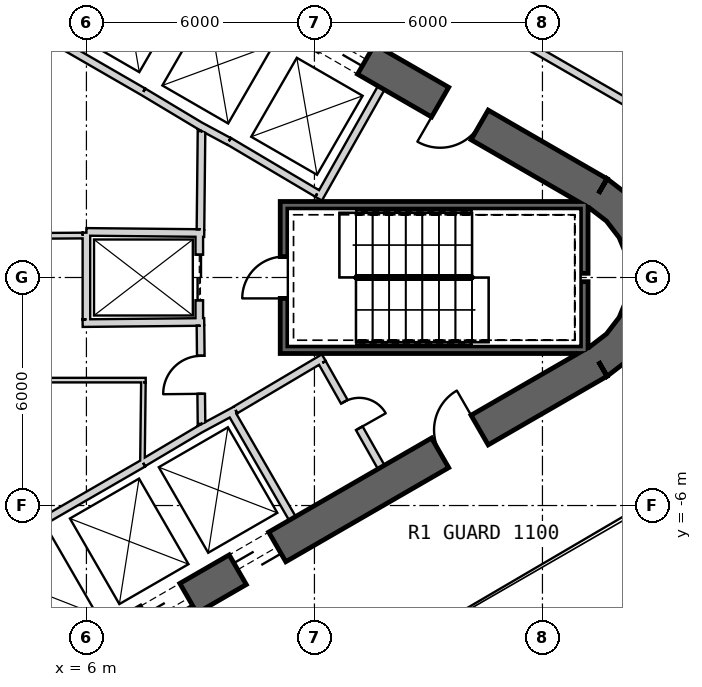
"""IFC4 building model, lengths in metres.
Left out: names, types, materials, properties, quantities, classifications, styles, units other than length and angle.
Written with IfcOpenShell. Run it as: python <this file> out.ifc"""

import sys

from ifc_helpers import new_model, si_unit, direction, frame, frame_2d, origin, place, context, subcontext, project, spatial, polyline, rectangle, outline, extrude, element, fill, save


model = new_model("IFC4")
c1 = context("Model", 3, precision=1e-05, world=origin(), true_north=direction((0.0, 1.0)))
c2 = subcontext(c1, "Body", "Model", "MODEL_VIEW")
j1 = project(units=[si_unit("LENGTHUNIT", "METRE"), si_unit("PLANEANGLEUNIT", "RADIAN")], contexts=[c1])
p1 = place(None, origin())
s1 = spatial("IfcSite", under=j1, at=p1, CompositionType="ELEMENT")
p2 = place(p1, origin())
s2 = spatial("IfcBuilding", under=s1, at=p2, CompositionType="ELEMENT")
p3 = place(p2, frame((0.0, 0.0, 27.5)))
s3 = spatial("IfcBuildingStorey", under=s2, at=p3, CompositionType="ELEMENT", Elevation=27.5)
p4 = place(p3, frame((19.475, 2.208, 0.0), z_axis=(0.0, 0.0, 1.0), x_axis=(-0.866028369851, 0.499994862586, 0.0)))
e1 = element("IfcWall", 1, at=p4, inside=s3, PredefinedType="SHEAR", context=c2, shape_type="SweptSolid", body=[
    extrude(rectangle(XDim=31.523, YDim=0.9, at=frame_2d((15.762, 0.0))), origin(), (0.0, 0.0, 1.0), 6.0),
])
p5 = place(p4, frame((7.062, 0.0, 0.0)))
e2 = element("IfcOpeningElement", 2, at=p5, cuts=e1, PredefinedType="OPENING", context=c2, shape_type="SweptSolid", body=[
    extrude(rectangle(XDim=1.2, YDim=2.4, at=frame_2d((0.6, 1.2))), frame((0.0, 0.46, 0.0), z_axis=(0.0, -1.0, 0.0), x_axis=(1.0, 0.0, 0.0)), (0.0, 0.0, 1.0), 0.92),
])
p6 = place(p4, frame((9.762, 0.0, 0.0)))
e3 = element("IfcOpeningElement", 3, at=p6, cuts=e1, PredefinedType="OPENING", context=c2, shape_type="SweptSolid", body=[
    extrude(rectangle(XDim=1.2, YDim=2.4, at=frame_2d((0.6, 1.2))), frame((0.0, 0.46, 0.0), z_axis=(0.0, -1.0, 0.0), x_axis=(1.0, 0.0, 0.0)), (0.0, 0.0, 1.0), 0.92),
])
p7 = place(p4, frame((12.462, 0.0, 0.0)))
e4 = element("IfcOpeningElement", 4, at=p7, cuts=e1, PredefinedType="OPENING", context=c2, shape_type="SweptSolid", body=[
    extrude(rectangle(XDim=1.2, YDim=2.4, at=frame_2d((0.6, 1.2))), frame((0.0, 0.46, 0.0), z_axis=(0.0, -1.0, 0.0), x_axis=(1.0, 0.0, 0.0)), (0.0, 0.0, 1.0), 0.92),
])
p8 = place(p4, frame((15.162, 0.0, 0.0)))
e5 = element("IfcOpeningElement", 5, at=p8, cuts=e1, PredefinedType="OPENING", context=c2, shape_type="SweptSolid", body=[
    extrude(rectangle(XDim=1.2, YDim=2.4, at=frame_2d((0.6, 1.2))), frame((0.0, 0.46, 0.0), z_axis=(0.0, -1.0, 0.0), x_axis=(1.0, 0.0, 0.0)), (0.0, 0.0, 1.0), 0.92),
])
p9 = place(p4, frame((17.862, 0.0, 0.0)))
e6 = element("IfcOpeningElement", 6, at=p9, cuts=e1, PredefinedType="OPENING", context=c2, shape_type="SweptSolid", body=[
    extrude(rectangle(XDim=1.2, YDim=2.4, at=frame_2d((0.6, 1.2))), frame((0.0, 0.46, 0.0), z_axis=(0.0, -1.0, 0.0), x_axis=(1.0, 0.0, 0.0)), (0.0, 0.0, 1.0), 0.92),
])
p10 = place(p4, frame((20.562, 0.0, 0.0)))
e7 = element("IfcOpeningElement", 7, at=p10, cuts=e1, PredefinedType="OPENING", context=c2, shape_type="SweptSolid", body=[
    extrude(rectangle(XDim=1.2, YDim=2.4, at=frame_2d((0.6, 1.2))), frame((0.0, 0.46, 0.0), z_axis=(0.0, -1.0, 0.0), x_axis=(1.0, 0.0, 0.0)), (0.0, 0.0, 1.0), 0.92),
])
p11 = place(p4, frame((23.262, 0.0, 0.0)))
e8 = element("IfcOpeningElement", 8, at=p11, cuts=e1, PredefinedType="OPENING", context=c2, shape_type="SweptSolid", body=[
    extrude(rectangle(XDim=1.2, YDim=2.4, at=frame_2d((0.6, 1.2))), frame((0.0, 0.46, 0.0), z_axis=(0.0, -1.0, 0.0), x_axis=(1.0, 0.0, 0.0)), (0.0, 0.0, 1.0), 0.92),
])
p12 = place(p4, frame((3.612, 0.0, 0.0)))
e9 = element("IfcOpeningElement", 9, at=p12, cuts=e1, PredefinedType="OPENING", context=c2, shape_type="SweptSolid", body=[
    extrude(rectangle(XDim=1.2, YDim=2.4, at=frame_2d((0.6, 1.2))), frame((0.0, 0.46, 0.0), z_axis=(0.0, -1.0, 0.0), x_axis=(1.0, 0.0, 0.0)), (0.0, 0.0, 1.0), 0.92),
])
p13 = place(p4, frame((26.712, 0.0, 0.0)))
e10 = element("IfcOpeningElement", 10, at=p13, cuts=e1, PredefinedType="OPENING", context=c2, shape_type="SweptSolid", body=[
    extrude(rectangle(XDim=1.2, YDim=2.4, at=frame_2d((0.6, 1.2))), frame((0.0, 0.46, 0.0), z_axis=(0.0, -1.0, 0.0), x_axis=(1.0, 0.0, 0.0)), (0.0, 0.0, 1.0), 0.92),
])
p14 = place(p3, frame((-7.825, -17.97, 0.0), z_axis=(0.0, 0.0, 1.0), x_axis=(0.866028369851, 0.499994862586, 0.0)))
e11 = element("IfcWall", 11, at=p14, inside=s3, PredefinedType="SHEAR", context=c2, shape_type="SweptSolid", body=[
    extrude(rectangle(XDim=31.523, YDim=0.9, at=frame_2d((15.762, 0.0))), origin(), (0.0, 0.0, 1.0), 6.0),
])
p15 = place(p14, frame((7.062, 0.0, 0.0)))
e12 = element("IfcOpeningElement", 12, at=p15, cuts=e11, PredefinedType="OPENING", context=c2, shape_type="SweptSolid", body=[
    extrude(rectangle(XDim=1.2, YDim=2.4, at=frame_2d((0.6, 1.2))), frame((0.0, 0.46, 0.0), z_axis=(0.0, -1.0, 0.0), x_axis=(1.0, 0.0, 0.0)), (0.0, 0.0, 1.0), 0.92),
])
p16 = place(p14, frame((9.762, 0.0, 0.0)))
e13 = element("IfcOpeningElement", 13, at=p16, cuts=e11, PredefinedType="OPENING", context=c2, shape_type="SweptSolid", body=[
    extrude(rectangle(XDim=1.2, YDim=2.4, at=frame_2d((0.6, 1.2))), frame((0.0, 0.46, 0.0), z_axis=(0.0, -1.0, 0.0), x_axis=(1.0, 0.0, 0.0)), (0.0, 0.0, 1.0), 0.92),
])
p17 = place(p14, frame((12.462, 0.0, 0.0)))
e14 = element("IfcOpeningElement", 14, at=p17, cuts=e11, PredefinedType="OPENING", context=c2, shape_type="SweptSolid", body=[
    extrude(rectangle(XDim=1.2, YDim=2.4, at=frame_2d((0.6, 1.2))), frame((0.0, 0.46, 0.0), z_axis=(0.0, -1.0, 0.0), x_axis=(1.0, 0.0, 0.0)), (0.0, 0.0, 1.0), 0.92),
])
p18 = place(p14, frame((15.162, 0.0, 0.0)))
e15 = element("IfcOpeningElement", 15, at=p18, cuts=e11, PredefinedType="OPENING", context=c2, shape_type="SweptSolid", body=[
    extrude(rectangle(XDim=1.2, YDim=2.4, at=frame_2d((0.6, 1.2))), frame((0.0, 0.46, 0.0), z_axis=(0.0, -1.0, 0.0), x_axis=(1.0, 0.0, 0.0)), (0.0, 0.0, 1.0), 0.92),
])
p19 = place(p14, frame((17.862, 0.0, 0.0)))
e16 = element("IfcOpeningElement", 16, at=p19, cuts=e11, PredefinedType="OPENING", context=c2, shape_type="SweptSolid", body=[
    extrude(rectangle(XDim=1.2, YDim=2.4, at=frame_2d((0.6, 1.2))), frame((0.0, 0.46, 0.0), z_axis=(0.0, -1.0, 0.0), x_axis=(1.0, 0.0, 0.0)), (0.0, 0.0, 1.0), 0.92),
])
p20 = place(p14, frame((20.562, 0.0, 0.0)))
e17 = element("IfcOpeningElement", 17, at=p20, cuts=e11, PredefinedType="OPENING", context=c2, shape_type="SweptSolid", body=[
    extrude(rectangle(XDim=1.2, YDim=2.4, at=frame_2d((0.6, 1.2))), frame((0.0, 0.46, 0.0), z_axis=(0.0, -1.0, 0.0), x_axis=(1.0, 0.0, 0.0)), (0.0, 0.0, 1.0), 0.92),
])
p21 = place(p14, frame((26.712, 0.0, 0.0)))
e18 = element("IfcOpeningElement", 18, at=p21, cuts=e11, PredefinedType="OPENING", context=c2, shape_type="SweptSolid", body=[
    extrude(rectangle(XDim=1.2, YDim=2.4, at=frame_2d((0.6, 1.2))), frame((0.0, 0.46, 0.0), z_axis=(0.0, -1.0, 0.0), x_axis=(1.0, 0.0, 0.0)), (0.0, 0.0, 1.0), 0.92),
])
p22 = place(p14, frame((3.612, 0.0, 0.0)))
e19 = element("IfcOpeningElement", 19, at=p22, cuts=e11, PredefinedType="OPENING", context=c2, shape_type="SweptSolid", body=[
    extrude(rectangle(XDim=1.2, YDim=2.4, at=frame_2d((0.6, 1.2))), frame((0.0, 0.46, 0.0), z_axis=(0.0, -1.0, 0.0), x_axis=(1.0, 0.0, 0.0)), (0.0, 0.0, 1.0), 0.92),
])
p23 = place(p3, origin())
e20 = element("IfcWall", 20, at=p23, inside=s3, PredefinedType="SHEAR", context=c2, shape_type="SweptSolid", body=[
    extrude(outline(polyline([(19.7, -2.598), (20.321, -2.121), (20.798, -1.5), (21.098, -0.777), (21.2, 0.0), (21.098, 0.777), (20.798, 1.5), (20.321, 2.121), (19.7, 2.598), (19.25, 1.819), (19.685, 1.485), (20.019, 1.05), (20.229, 0.543), (20.3, 0.0), (20.229, -0.543), (20.019, -1.05), (19.685, -1.485), (19.25, -1.819), (19.7, -2.598)])), origin(), (0.0, 0.0, 1.0), 6.0),
])
p24 = place(p3, frame((7.497, 4.886, 0.0), z_axis=(0.0, 0.0, 1.0), x_axis=(-0.866030989016, 0.499990325971, 0.0)))
e21 = element("IfcWall", 21, at=p24, inside=s3, PredefinedType="PLUMBINGWALL", context=c2, shape_type="SweptSolid", body=[
    extrude(rectangle(XDim=8.1, YDim=0.2, at=frame_2d((4.05, 0.0))), origin(), (0.0, 0.0, 1.0), 5.7),
])
p25 = place(p3, frame((12.11, 2.073, 0.0), z_axis=(0.0, 0.0, 1.0), x_axis=(0.49196600604, 0.870614408852, 0.0)))
e22 = element("IfcWall", 22, at=p25, inside=s3, PredefinedType="PLUMBINGWALL", context=c2, shape_type="SweptSolid", body=[
    extrude(rectangle(XDim=3.35, YDim=0.2, at=frame_2d((1.675, 0.0))), origin(), (0.0, 0.0, 1.0), 5.7),
])
p26 = place(p3, frame((12.073, 2.211, 0.0), z_axis=(0.0, 0.0, 1.0), x_axis=(-0.860438357912, 0.509554542943, 0.0)))
e23 = element("IfcWall", 23, at=p26, inside=s3, PredefinedType="PLUMBINGWALL", context=c2, shape_type="SweptSolid", body=[
    extrude(rectangle(XDim=2.7, YDim=0.2, at=frame_2d((1.35, 0.0))), origin(), (0.0, 0.0, 1.0), 5.7),
])
p27 = place(p3, frame((9.748, 3.583, 0.0), z_axis=(0.0, 0.0, 1.0), x_axis=(-0.880917147855, 0.473270513147, 0.0)))
e24 = element("IfcWall", 24, at=p27, inside=s3, PredefinedType="PLUMBINGWALL", context=c2, shape_type="SweptSolid", body=[
    extrude(rectangle(XDim=0.878, YDim=0.2, at=frame_2d((0.439, 0.0))), origin(), (0.0, 0.0, 1.0), 5.7),
])
p28 = place(p3, frame((9.079, 3.937, 0.0), z_axis=(0.0, 0.0, 1.0), x_axis=(-0.857516281273, 0.51445682749, 0.0)))
e25 = element("IfcWall", 25, at=p28, inside=s3, PredefinedType="PLUMBINGWALL", context=c2, shape_type="SweptSolid", body=[
    extrude(rectangle(XDim=1.845, YDim=0.2, at=frame_2d((0.922, 0.0))), origin(), (0.0, 0.0, 1.0), 5.7),
])
p29 = place(p3, frame((0.483, -8.936, 0.0), z_axis=(0.0, 0.0, 1.0), x_axis=(0.866030989016, 0.499990325971, 0.0)))
e26 = element("IfcWall", 26, at=p29, inside=s3, PredefinedType="PLUMBINGWALL", context=c2, shape_type="SweptSolid", body=[
    extrude(rectangle(XDim=8.1, YDim=0.2, at=frame_2d((4.05, 0.0))), origin(), (0.0, 0.0, 1.0), 5.7),
])
p30 = place(p3, frame((9.795, -3.525, 0.0), z_axis=(0.0, 0.0, 1.0), x_axis=(0.499984717929, -0.866034226713, 0.0)))
e27 = element("IfcWall", 27, at=p30, inside=s3, PredefinedType="PLUMBINGWALL", context=c2, shape_type="SweptSolid", body=[
    extrude(rectangle(XDim=3.25, YDim=0.2, at=frame_2d((1.625, 0.0))), origin(), (0.0, 0.0, 1.0), 5.7),
])
p31 = place(p3, frame((8.974, -3.999, 0.0), z_axis=(0.0, 0.0, 1.0), x_axis=(0.880907015104, 0.473289373154, 0.0)))
e28 = element("IfcWall", 28, at=p31, inside=s3, PredefinedType="PLUMBINGWALL", context=c2, shape_type="SweptSolid", body=[
    extrude(rectangle(XDim=1.078, YDim=0.2, at=frame_2d((0.539, 0.0))), origin(), (0.0, 0.0, 1.0), 5.7),
])
p32 = place(p3, frame((7.493, -4.878, 0.0), z_axis=(0.0, 0.0, 1.0), x_axis=(0.859981807212, 0.510324691999, 0.0)))
e29 = element("IfcWall", 29, at=p32, inside=s3, PredefinedType="PLUMBINGWALL", context=c2, shape_type="SweptSolid", body=[
    extrude(rectangle(XDim=1.845, YDim=0.2, at=frame_2d((0.922, 0.0))), origin(), (0.0, 0.0, 1.0), 5.7),
])
p33 = place(p3, frame((19.2, 1.9, -0.3), z_axis=(0.0, 0.0, 1.0), x_axis=(-1.0, 0.0, 0.0)))
e30 = element("IfcWall", 30, at=p33, inside=s3, PredefinedType="SHEAR", context=c2, shape_type="SweptSolid", body=[
    extrude(rectangle(XDim=8.1, YDim=0.2, at=frame_2d((4.05, 0.0))), origin(), (0.0, 0.0, 1.0), 6.0),
])
p34 = place(p3, frame((19.1, -2.0, -0.3), z_axis=(0.0, 0.0, 1.0), x_axis=(0.0, 1.0, 0.0)))
e31 = element("IfcWall", 31, at=p34, inside=s3, PredefinedType="SHEAR", context=c2, shape_type="SweptSolid", body=[
    extrude(rectangle(XDim=1.89, YDim=0.2, at=frame_2d((0.945, 0.0))), origin(), (0.0, 0.0, 1.0), 6.0),
])
p35 = place(p3, frame((19.1, 0.11, -0.3), z_axis=(0.0, 0.0, 1.0), x_axis=(0.0, 1.0, 0.0)))
e32 = element("IfcWall", 32, at=p35, inside=s3, PredefinedType="SHEAR", context=c2, shape_type="SweptSolid", body=[
    extrude(rectangle(XDim=1.69, YDim=0.2, at=frame_2d((0.845, 0.0))), origin(), (0.0, 0.0, 1.0), 6.0),
])
p36 = place(p3, frame((11.1, -1.9, -0.3), z_axis=(0.0, 0.0, 1.0), x_axis=(1.0, 0.0, 0.0)))
e33 = element("IfcWall", 33, at=p36, inside=s3, PredefinedType="SHEAR", context=c2, shape_type="SweptSolid", body=[
    extrude(rectangle(XDim=7.9, YDim=0.2, at=frame_2d((3.95, 0.0))), origin(), (0.0, 0.0, 1.0), 6.0),
])
p37 = place(p3, frame((11.2, -1.8, -0.3), z_axis=(0.0, 0.0, 1.0), x_axis=(0.0, 1.0, 0.0)))
e34 = element("IfcWall", 34, at=p37, inside=s3, PredefinedType="SHEAR", context=c2, shape_type="SweptSolid", body=[
    extrude(rectangle(XDim=3.6, YDim=0.2, at=frame_2d((1.8, 0.0))), origin(), (0.0, 0.0, 1.0), 6.0),
])
p38 = place(p37, frame((1.25, 0.0, 0.3)))
e35 = element("IfcOpeningElement", 35, at=p38, cuts=e34, PredefinedType="OPENING", context=c2, shape_type="SweptSolid", body=[
    extrude(rectangle(XDim=1.1, YDim=2.1, at=frame_2d((0.55, 1.05))), frame((0.0, 0.11, 0.0), z_axis=(0.0, -1.0, 0.0), x_axis=(1.0, 0.0, 0.0)), (0.0, 0.0, 1.0), 0.22),
])
p39 = place(p3, frame((8.97, 1.2, 0.0), z_axis=(0.0, 0.0, 1.0), x_axis=(0.0, -1.0, 0.0)))
e36 = element("IfcWall", 36, at=p39, inside=s3, PredefinedType="PLUMBINGWALL", context=c2, shape_type="SweptSolid", body=[
    extrude(rectangle(XDim=2.4, YDim=0.2, at=frame_2d((1.2, 0.0))), origin(), (0.0, 0.0, 1.0), 5.7),
])
p40 = place(p39, frame((0.6, 0.0, 0.0)))
e37 = element("IfcOpeningElement", 37, at=p40, cuts=e36, PredefinedType="OPENING", context=c2, shape_type="SweptSolid", body=[
    extrude(rectangle(XDim=1.2, YDim=2.4, at=frame_2d((0.6, 1.2))), frame((0.0, 0.11, 0.0), z_axis=(0.0, -1.0, 0.0), x_axis=(1.0, 0.0, 0.0)), (0.0, 0.0, 1.0), 0.22),
])
p41 = place(p3, frame((6.0, 1.2, 0.0), z_axis=(0.0, 0.0, 1.0), x_axis=(0.999949988, -0.010001074852, 0.0)))
e38 = element("IfcWall", 38, at=p41, inside=s3, PredefinedType="PLUMBINGWALL", context=c2, shape_type="SweptSolid", body=[
    extrude(rectangle(XDim=3.1, YDim=0.2, at=frame_2d((1.55, 0.0))), origin(), (0.0, 0.0, 1.0), 5.7),
])
p42 = place(p3, frame((5.9, -1.201, 0.0), z_axis=(0.0, 0.0, 1.0), x_axis=(0.999950064753, 0.009993397809, 0.0)))
e39 = element("IfcWall", 39, at=p42, inside=s3, PredefinedType="PLUMBINGWALL", context=c2, shape_type="SweptSolid", body=[
    extrude(rectangle(XDim=3.2, YDim=0.2, at=frame_2d((1.6, 0.0))), origin(), (0.0, 0.0, 1.0), 5.7),
])
p43 = place(p3, frame((6.0, -1.1, 0.0), z_axis=(0.0, 0.0, 1.0), x_axis=(0.0, 1.0, 0.0)))
e40 = element("IfcWall", 40, at=p43, inside=s3, PredefinedType="PLUMBINGWALL", context=c2, shape_type="SweptSolid", body=[
    extrude(rectangle(XDim=2.28, YDim=0.2, at=frame_2d((1.14, 0.0))), origin(), (0.0, 0.0, 1.0), 5.7),
])
p44 = place(p3, frame((12.245, -2.109, 0.0), z_axis=(0.0, 0.0, 1.0), x_axis=(-0.860414880418, -0.509594185166, 0.0)))
e41 = element("IfcWall", 41, at=p44, inside=s3, PredefinedType="PARTITIONING", context=c2, shape_type="SweptSolid", body=[
    extrude(rectangle(XDim=2.7, YDim=0.2, at=frame_2d((1.35, 0.0))), origin(), (0.0, 0.0, 1.0), 5.7),
])
p45 = place(p3, frame((13.758, -4.99, 0.0), z_axis=(0.0, 0.0, 1.0), x_axis=(-0.491993409184, 0.87059892334, 0.0)))
e42 = element("IfcWall", 42, at=p45, inside=s3, PredefinedType="PARTITIONING", context=c2, shape_type="SweptSolid", body=[
    extrude(rectangle(XDim=3.15, YDim=0.2, at=frame_2d((1.575, 0.0))), origin(), (0.0, 0.0, 1.0), 5.7),
])
p46 = place(p45, frame((1.175, 0.0, 0.0)))
e43 = element("IfcOpeningElement", 43, at=p46, cuts=e42, PredefinedType="OPENING", context=c2, shape_type="SweptSolid", body=[
    extrude(rectangle(XDim=0.8, YDim=2.1, at=frame_2d((0.4, 1.05))), frame((0.0, 0.11, 0.0), z_axis=(0.0, -1.0, 0.0), x_axis=(1.0, 0.0, 0.0)), (0.0, 0.0, 1.0), 0.22),
])
p47 = place(p3, frame((9.001, 1.27, 0.0), z_axis=(0.0, 0.0, 1.0), x_axis=(0.010784614026, 0.999941844359, 0.0)))
e44 = element("IfcWall", 44, at=p47, inside=s3, PredefinedType="PARTITIONING", context=c2, shape_type="SweptSolid", body=[
    extrude(rectangle(XDim=2.581, YDim=0.2, at=frame_2d((1.291, 0.0))), origin(), (0.0, 0.0, 1.0), 5.7),
])
p48 = place(p3, frame((9.029, -3.851, 0.0), z_axis=(0.0, 0.0, 1.0), x_axis=(-0.010783593937, 0.99994185536, 0.0)))
e45 = element("IfcWall", 45, at=p48, inside=s3, PredefinedType="PARTITIONING", context=c2, shape_type="SweptSolid", body=[
    extrude(rectangle(XDim=2.581, YDim=0.2, at=frame_2d((1.291, 0.0))), origin(), (0.0, 0.0, 1.0), 5.7),
])
p49 = place(p48, frame((0.791, 0.0, 0.0)))
e46 = element("IfcOpeningElement", 46, at=p49, cuts=e45, PredefinedType="OPENING", context=c2, shape_type="SweptSolid", body=[
    extrude(rectangle(XDim=1.0, YDim=2.1, at=frame_2d((0.5, 1.05))), frame((0.0, 0.11, 0.0), z_axis=(0.0, -1.0, 0.0), x_axis=(1.0, 0.0, 0.0)), (0.0, 0.0, 1.0), 0.22),
])
p50 = place(p3, frame((1.388, 1.074, 0.0), z_axis=(0.0, 0.0, 1.0), x_axis=(0.99997856967, 0.006546770205, 0.0)))
e47 = element("IfcWall", 47, at=p50, inside=s3, PredefinedType="PLUMBINGWALL", context=c2, shape_type="SweptSolid", body=[
    extrude(rectangle(XDim=4.512, YDim=0.15, at=frame_2d((2.256, 0.0))), origin(), (0.0, 0.0, 1.0), 5.7),
])
p51 = place(p50, frame((1.92, 0.0, 0.0)))
e48 = element("IfcOpeningElement", 48, at=p51, cuts=e47, PredefinedType="OPENING", context=c2, shape_type="SweptSolid", body=[
    extrude(rectangle(XDim=0.8, YDim=2.1, at=frame_2d((0.4, 1.05))), frame((0.0, 0.085, 0.0), z_axis=(0.0, -1.0, 0.0), x_axis=(1.0, 0.0, 0.0)), (0.0, 0.0, 1.0), 0.17),
])
p52 = place(p3, frame((7.56, -2.7, 0.0), z_axis=(0.0, 0.0, 1.0), x_axis=(-1.0, 0.0, 0.0)))
e49 = element("IfcWall", 49, at=p52, inside=s3, PredefinedType="PARTITIONING", context=c2, shape_type="SweptSolid", body=[
    extrude(rectangle(XDim=3.0, YDim=0.12, at=frame_2d((1.5, 0.0))), origin(), (0.0, 0.0, 1.0), 5.7),
])
p53 = place(p3, frame((7.475, -4.865, 0.0), z_axis=(0.0, 0.0, 1.0), x_axis=(0.011716133148, 0.999931363757, 0.0)))
e50 = element("IfcWall", 50, at=p53, inside=s3, PredefinedType="PARTITIONING", context=c2, shape_type="SweptSolid", body=[
    extrude(rectangle(XDim=2.105, YDim=0.12, at=frame_2d((1.052, 0.0))), origin(), (0.0, 0.0, 1.0), 5.7),
])
p54 = place(p3, frame((21.161, 4.064, 0.0), z_axis=(0.0, 0.0, 1.0), x_axis=(-0.866012938262, 0.500021590297, 0.0)))
e51 = element("IfcWall", 51, at=p54, inside=s3, PredefinedType="PARTITIONING", context=c2, shape_type="SweptSolid", body=[
    extrude(rectangle(XDim=4.592, YDim=0.2, at=frame_2d((2.296, 0.0))), origin(), (0.0, 0.0, 1.0), 4.88),
])
p55 = place(p38, origin())
e52 = element("IfcDoor", 52, at=p55, inside=s3, OperationType="SINGLE_SWING_LEFT", PredefinedType="USERDEFINED", context=c2, shape_type="SweptSolid", body=[
    extrude(rectangle(XDim=1.1, YDim=2.1, at=frame_2d((0.55, 1.05))), frame((0.0, 0.025, 0.0), z_axis=(0.0, -1.0, 0.0), x_axis=(1.0, 0.0, 0.0)), (0.0, 0.0, 1.0), 0.05),
])
fill(e35, e52)
p56 = place(p49, origin())
e53 = element("IfcDoor", 53, at=p56, inside=s3, OperationType="SINGLE_SWING_LEFT", PredefinedType="USERDEFINED", context=c2, shape_type="SweptSolid", body=[
    extrude(rectangle(XDim=1.0, YDim=2.1, at=frame_2d((0.5, 1.05))), frame((0.0, 0.025, 0.0), z_axis=(0.0, -1.0, 0.0), x_axis=(1.0, 0.0, 0.0)), (0.0, 0.0, 1.0), 0.05),
])
fill(e46, e53)
p57 = place(p40, origin())
e54 = element("IfcDoor", 54, at=p57, inside=s3, OperationType="SLIDING_TO_LEFT", PredefinedType="USERDEFINED", context=c2, shape_type="SweptSolid", body=[
    extrude(rectangle(XDim=1.2, YDim=2.4, at=frame_2d((0.6, 1.2))), frame((0.0, 0.025, 0.0), z_axis=(0.0, -1.0, 0.0), x_axis=(1.0, 0.0, 0.0)), (0.0, 0.0, 1.0), 0.05),
])
fill(e37, e54)
p58 = place(p46, origin())
e55 = element("IfcDoor", 55, at=p58, inside=s3, OperationType="SINGLE_SWING_LEFT", PredefinedType="USERDEFINED", context=c2, shape_type="SweptSolid", body=[
    extrude(rectangle(XDim=0.8, YDim=2.1, at=frame_2d((0.4, 1.05))), frame((0.0, 0.025, 0.0), z_axis=(0.0, -1.0, 0.0), x_axis=(1.0, 0.0, 0.0)), (0.0, 0.0, 1.0), 0.05),
])
fill(e43, e55)
p59 = place(p5, origin())
e56 = element("IfcDoor", 56, at=p59, inside=s3, OperationType="SLIDING_TO_LEFT", PredefinedType="USERDEFINED", context=c2, shape_type="SweptSolid", body=[
    extrude(rectangle(XDim=1.2, YDim=2.4, at=frame_2d((0.6, 1.2))), frame((0.0, 0.025, 0.0), z_axis=(0.0, -1.0, 0.0), x_axis=(1.0, 0.0, 0.0)), (0.0, 0.0, 1.0), 0.05),
])
fill(e2, e56)
p60 = place(p19, origin())
e57 = element("IfcDoor", 57, at=p60, inside=s3, OperationType="SLIDING_TO_LEFT", PredefinedType="USERDEFINED", context=c2, shape_type="SweptSolid", body=[
    extrude(rectangle(XDim=1.2, YDim=2.4, at=frame_2d((0.6, 1.2))), frame((0.0, 0.025, 0.0), z_axis=(0.0, -1.0, 0.0), x_axis=(1.0, 0.0, 0.0)), (0.0, 0.0, 1.0), 0.05),
])
fill(e16, e57)
p61 = place(p20, origin())
e58 = element("IfcDoor", 58, at=p61, inside=s3, OperationType="SLIDING_TO_LEFT", PredefinedType="USERDEFINED", context=c2, shape_type="SweptSolid", body=[
    extrude(rectangle(XDim=1.2, YDim=2.4, at=frame_2d((0.6, 1.2))), frame((0.0, 0.025, 0.0), z_axis=(0.0, -1.0, 0.0), x_axis=(1.0, 0.0, 0.0)), (0.0, 0.0, 1.0), 0.05),
])
fill(e17, e58)
p62 = place(p21, origin())
e59 = element("IfcDoor", 59, at=p62, inside=s3, OperationType="SINGLE_SWING_RIGHT", PredefinedType="USERDEFINED", context=c2, shape_type="SweptSolid", body=[
    extrude(rectangle(XDim=1.2, YDim=2.4, at=frame_2d((0.6, 1.2))), frame((0.0, 0.025, 0.0), z_axis=(0.0, -1.0, 0.0), x_axis=(1.0, 0.0, 0.0)), (0.0, 0.0, 1.0), 0.05),
])
fill(e18, e59)
p63 = place(p12, origin())
e60 = element("IfcDoor", 60, at=p63, inside=s3, OperationType="SINGLE_SWING_RIGHT", PredefinedType="USERDEFINED", context=c2, shape_type="SweptSolid", body=[
    extrude(rectangle(XDim=1.2, YDim=2.4, at=frame_2d((0.6, 1.2))), frame((0.0, 0.025, 0.0), z_axis=(0.0, -1.0, 0.0), x_axis=(1.0, 0.0, 0.0)), (0.0, 0.0, 1.0), 0.05),
])
fill(e9, e60)
save(model, sys.argv[1])
